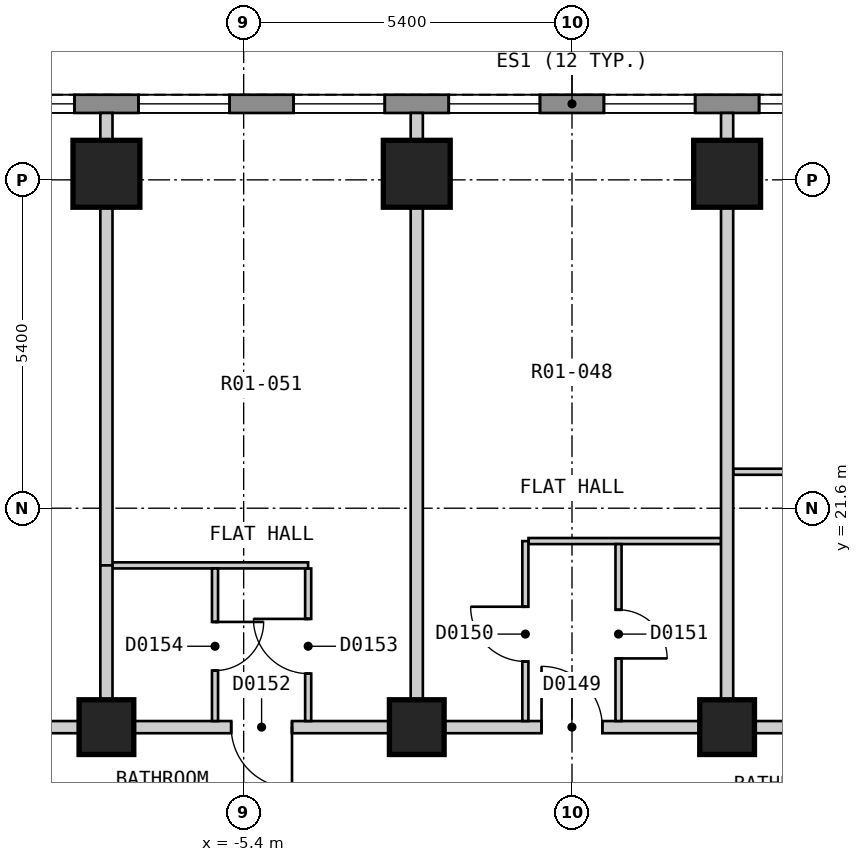
"""IFC4 building model, lengths in metres.
Left out: names, types, materials, properties, quantities, classifications, styles, units other than length and angle.
Written with IfcOpenShell. Run it as: python <this file> out.ifc"""

import sys

from ifc_helpers import new_model, si_unit, direction, frame, frame_2d, origin, origin_2d, place, context, subcontext, project, spatial, polyline, rectangle, outline, extrude, element, fill, save


model = new_model("IFC4")
c1 = context("Model", 3, precision=1e-05, world=origin(), true_north=direction((0.0, 1.0)))
c2 = subcontext(c1, "Body", "Model", "MODEL_VIEW")
j1 = project(units=[si_unit("LENGTHUNIT", "METRE"), si_unit("PLANEANGLEUNIT", "RADIAN")], contexts=[c1])
p1 = place(None, origin())
s1 = spatial("IfcSite", under=j1, at=p1, CompositionType="ELEMENT")
p2 = place(p1, origin())
s2 = spatial("IfcBuilding", under=s1, at=p2, CompositionType="ELEMENT")
p3 = place(p2, frame((0.0, 0.0, 29.4)))
s3 = spatial("IfcBuildingStorey", under=s2, at=p3, CompositionType="ELEMENT", Elevation=29.4)
for number, where, z_axis, x_axis in (
    (1, (2.551, 27.1, 0.0), (0.0, 0.0, 1.0), (-1.0, 0.0, 0.0)),
    (2, (-2.553, 27.1, 0.0), (0.0, 0.0, 1.0), (-1.0, 0.0, 0.0)),
    (3, (-7.657, 27.1, 0.0), (0.0, 0.0, 1.0), (-1.0, 0.0, 0.0)),
):
    element("IfcColumn", number, at=place(p3, frame(where, z_axis=z_axis, x_axis=x_axis)), inside=s3, PredefinedType="COLUMN", context=c2, shape_type="SweptSolid", body=[
        extrude(rectangle(XDim=1.1, YDim=1.1, at=origin_2d()), origin(), (0.0, 0.0, 1.0), 3.0),
    ])
for number, where, z_axis, x_axis in (
    (4, (2.551, 18.0, 0.0), (0.0, 0.0, 1.0), (-1.0, 0.0, 0.0)),
    (5, (-2.553, 18.0, 0.0), (0.0, 0.0, 1.0), (-1.0, 0.0, 0.0)),
    (6, (-7.657, 18.0, 0.0), (0.0, 0.0, 1.0), (-1.0, 0.0, 0.0)),
):
    element("IfcColumn", number, at=place(p3, frame(where, z_axis=z_axis, x_axis=x_axis)), inside=s3, PredefinedType="COLUMN", context=c2, shape_type="SweptSolid", body=[
        extrude(rectangle(XDim=0.9, YDim=0.9, at=origin_2d()), origin(), (0.0, 0.0, 1.0), 3.0),
    ])
p4 = place(p3, frame((13.51, 28.25, 0.0), z_axis=(0.0, 0.0, 1.0), x_axis=(-1.0, 0.0, 0.0)))
e7 = element("IfcWall", 7, at=p4, inside=s3, PredefinedType="SOLIDWALL", context=c2, shape_type="SweptSolid", body=[
    extrude(outline(polyline([(0.0, -0.15), (27.02, -0.15), (26.94, 0.15), (0.08, 0.15), (0.0, -0.15)])), origin(), (0.0, 0.0, 1.0), 2.7),
])
p5 = place(p4, frame((1.277, 0.0, 0.15)))
e8 = element("IfcOpeningElement", 8, at=p5, cuts=e7, PredefinedType="OPENING", context=c2, shape_type="SweptSolid", body=[
    extrude(rectangle(XDim=1.5, YDim=2.1, at=frame_2d((0.75, 1.05))), frame((0.0, 0.16, 0.0), z_axis=(0.0, -1.0, 0.0), x_axis=(1.0, 0.0, 0.0)), (0.0, 0.0, 1.0), 0.32),
])
p6 = place(p4, frame((3.829, 0.0, 0.15)))
e9 = element("IfcOpeningElement", 9, at=p6, cuts=e7, PredefinedType="OPENING", context=c2, shape_type="SweptSolid", body=[
    extrude(rectangle(XDim=1.5, YDim=2.1, at=frame_2d((0.75, 1.05))), frame((0.0, 0.16, 0.0), z_axis=(0.0, -1.0, 0.0), x_axis=(1.0, 0.0, 0.0)), (0.0, 0.0, 1.0), 0.32),
])
p7 = place(p4, frame((6.381, 0.0, 0.15)))
e10 = element("IfcOpeningElement", 10, at=p7, cuts=e7, PredefinedType="OPENING", context=c2, shape_type="SweptSolid", body=[
    extrude(rectangle(XDim=1.5, YDim=2.1, at=frame_2d((0.75, 1.05))), frame((0.0, 0.16, 0.0), z_axis=(0.0, -1.0, 0.0), x_axis=(1.0, 0.0, 0.0)), (0.0, 0.0, 1.0), 0.32),
])
p8 = place(p4, frame((8.933, 0.0, 0.15)))
e11 = element("IfcOpeningElement", 11, at=p8, cuts=e7, PredefinedType="OPENING", context=c2, shape_type="SweptSolid", body=[
    extrude(rectangle(XDim=1.5, YDim=2.1, at=frame_2d((0.75, 1.05))), frame((0.0, 0.16, 0.0), z_axis=(0.0, -1.0, 0.0), x_axis=(1.0, 0.0, 0.0)), (0.0, 0.0, 1.0), 0.32),
])
p9 = place(p4, frame((11.485, 0.0, 0.15)))
e12 = element("IfcOpeningElement", 12, at=p9, cuts=e7, PredefinedType="OPENING", context=c2, shape_type="SweptSolid", body=[
    extrude(rectangle(XDim=1.5, YDim=2.1, at=frame_2d((0.75, 1.05))), frame((0.0, 0.16, 0.0), z_axis=(0.0, -1.0, 0.0), x_axis=(1.0, 0.0, 0.0)), (0.0, 0.0, 1.0), 0.32),
])
p10 = place(p4, frame((14.037, 0.0, 0.15)))
e13 = element("IfcOpeningElement", 13, at=p10, cuts=e7, PredefinedType="OPENING", context=c2, shape_type="SweptSolid", body=[
    extrude(rectangle(XDim=1.5, YDim=2.1, at=frame_2d((0.75, 1.05))), frame((0.0, 0.16, 0.0), z_axis=(0.0, -1.0, 0.0), x_axis=(1.0, 0.0, 0.0)), (0.0, 0.0, 1.0), 0.32),
])
p11 = place(p4, frame((16.589, 0.0, 0.15)))
e14 = element("IfcOpeningElement", 14, at=p11, cuts=e7, PredefinedType="OPENING", context=c2, shape_type="SweptSolid", body=[
    extrude(rectangle(XDim=1.5, YDim=2.1, at=frame_2d((0.75, 1.05))), frame((0.0, 0.16, 0.0), z_axis=(0.0, -1.0, 0.0), x_axis=(1.0, 0.0, 0.0)), (0.0, 0.0, 1.0), 0.32),
])
p12 = place(p4, frame((19.141, 0.0, 0.15)))
e15 = element("IfcOpeningElement", 15, at=p12, cuts=e7, PredefinedType="OPENING", context=c2, shape_type="SweptSolid", body=[
    extrude(rectangle(XDim=1.5, YDim=2.1, at=frame_2d((0.75, 1.05))), frame((0.0, 0.16, 0.0), z_axis=(0.0, -1.0, 0.0), x_axis=(1.0, 0.0, 0.0)), (0.0, 0.0, 1.0), 0.32),
])
p13 = place(p4, frame((21.693, 0.0, 0.15)))
e16 = element("IfcOpeningElement", 16, at=p13, cuts=e7, PredefinedType="OPENING", context=c2, shape_type="SweptSolid", body=[
    extrude(rectangle(XDim=1.5, YDim=2.1, at=frame_2d((0.75, 1.05))), frame((0.0, 0.16, 0.0), z_axis=(0.0, -1.0, 0.0), x_axis=(1.0, 0.0, 0.0)), (0.0, 0.0, 1.0), 0.32),
])
p14 = place(p4, frame((24.245, 0.0, 0.15)))
e17 = element("IfcOpeningElement", 17, at=p14, cuts=e7, PredefinedType="OPENING", context=c2, shape_type="SweptSolid", body=[
    extrude(rectangle(XDim=1.5, YDim=2.1, at=frame_2d((0.75, 1.05))), frame((0.0, 0.16, 0.0), z_axis=(0.0, -1.0, 0.0), x_axis=(1.0, 0.0, 0.0)), (0.0, 0.0, 1.0), 0.32),
])
p15 = place(p3, frame((-10.276, 18.0, 0.0), z_axis=(0.0, 0.0, 1.0), x_axis=(1.0, 0.0, 0.0)))
e18 = element("IfcWall", 18, at=p15, inside=s3, PredefinedType="PARTITIONING", context=c2, shape_type="SweptSolid", body=[
    extrude(rectangle(XDim=20.61, YDim=0.2, at=frame_2d((10.305, 0.0))), origin(), (0.0, 0.0, 1.0), 2.7),
])
p16 = place(p15, frame((14.879, 0.0, 0.0)))
e19 = element("IfcOpeningElement", 19, at=p16, cuts=e18, PredefinedType="OPENING", context=c2, shape_type="SweptSolid", body=[
    extrude(rectangle(XDim=1.0, YDim=2.1, at=frame_2d((0.5, 1.05))), frame((0.0, 0.11, 0.0), z_axis=(0.0, -1.0, 0.0), x_axis=(1.0, 0.0, 0.0)), (0.0, 0.0, 1.0), 0.22),
])
p17 = place(p15, frame((9.775, 0.0, 0.0)))
e20 = element("IfcOpeningElement", 20, at=p17, cuts=e18, PredefinedType="OPENING", context=c2, shape_type="SweptSolid", body=[
    extrude(rectangle(XDim=1.0, YDim=2.1, at=frame_2d((0.5, 1.05))), frame((0.0, 0.11, 0.0), z_axis=(0.0, -1.0, 0.0), x_axis=(1.0, 0.0, 0.0)), (0.0, 0.0, 1.0), 0.22),
])
p18 = place(p15, frame((4.671, 0.0, 0.0)))
e21 = element("IfcOpeningElement", 21, at=p18, cuts=e18, PredefinedType="OPENING", context=c2, shape_type="SweptSolid", body=[
    extrude(rectangle(XDim=1.0, YDim=2.1, at=frame_2d((0.5, 1.05))), frame((0.0, 0.11, 0.0), z_axis=(0.0, -1.0, 0.0), x_axis=(1.0, 0.0, 0.0)), (0.0, 0.0, 1.0), 0.22),
])
p19 = place(p15, frame((0.837, 0.0, 0.0)))
e22 = element("IfcOpeningElement", 22, at=p19, cuts=e18, PredefinedType="OPENING", context=c2, shape_type="SweptSolid", body=[
    extrude(rectangle(XDim=0.8, YDim=2.1, at=frame_2d((0.4, 1.05))), frame((0.0, 0.11, 0.0), z_axis=(0.0, -1.0, 0.0), x_axis=(1.0, 0.0, 0.0)), (0.0, 0.0, 1.0), 0.22),
])
p20 = place(p3, frame((-4.339, 20.609, 0.0), z_axis=(0.0, 0.0, 1.0), x_axis=(0.0, -1.0, 0.0)))
e23 = element("IfcWall", 23, at=p20, inside=s3, PredefinedType="PARTITIONING", context=c2, shape_type="SweptSolid", body=[
    extrude(rectangle(XDim=2.509, YDim=0.1, at=frame_2d((1.254, 0.0))), origin(), (0.0, 0.0, 1.0), 2.7),
])
p21 = place(p20, frame((0.829, 0.0, 0.0)))
e24 = element("IfcOpeningElement", 24, at=p21, cuts=e23, PredefinedType="OPENING", context=c2, shape_type="SweptSolid", body=[
    extrude(rectangle(XDim=0.9, YDim=2.1, at=frame_2d((0.45, 1.05))), frame((0.0, 0.06, 0.0), z_axis=(0.0, -1.0, 0.0), x_axis=(1.0, 0.0, 0.0)), (0.0, 0.0, 1.0), 0.12),
])
p22 = place(p3, frame((-7.557, 20.66, 0.0), z_axis=(0.0, 0.0, 1.0), x_axis=(1.0, 0.0, 0.0)))
e25 = element("IfcWall", 25, at=p22, inside=s3, PredefinedType="PARTITIONING", context=c2, shape_type="SweptSolid", body=[
    extrude(rectangle(XDim=3.217, YDim=0.1, at=frame_2d((1.608, 0.0))), origin(), (0.0, 0.0, 1.0), 2.7),
])
p23 = place(p3, frame((-0.716, 21.06, 0.0), z_axis=(0.0, 0.0, 1.0), x_axis=(1.0, 0.0, 0.0)))
e26 = element("IfcWall", 26, at=p23, inside=s3, PredefinedType="PARTITIONING", context=c2, shape_type="SweptSolid", body=[
    extrude(rectangle(XDim=3.167, YDim=0.1, at=frame_2d((1.583, 0.0))), origin(), (0.0, 0.0, 1.0), 2.7),
])
p24 = place(p3, frame((2.651, 22.2, 0.0), z_axis=(0.0, 0.0, 1.0), x_axis=(1.0, 0.0, 0.0)))
e27 = element("IfcWall", 27, at=p24, inside=s3, PredefinedType="PARTITIONING", context=c2, shape_type="SweptSolid", body=[
    extrude(rectangle(XDim=10.109, YDim=0.1, at=frame_2d((5.055, 0.0))), origin(), (0.0, 0.0, 1.0), 2.7),
])
p25 = place(p24, frame((2.002, 0.0, 0.0)))
e28 = element("IfcOpeningElement", 28, at=p25, cuts=e27, PredefinedType="OPENING", context=c2, shape_type="SweptSolid", body=[
    extrude(rectangle(XDim=0.9, YDim=2.1, at=frame_2d((0.45, 1.05))), frame((0.0, 0.06, 0.0), z_axis=(0.0, -1.0, 0.0), x_axis=(1.0, 0.0, 0.0)), (0.0, 0.0, 1.0), 0.12),
])
p26 = place(p24, frame((7.185, 0.0, 0.0)))
e29 = element("IfcOpeningElement", 29, at=p26, cuts=e27, PredefinedType="OPENING", context=c2, shape_type="SweptSolid", body=[
    extrude(rectangle(XDim=0.8, YDim=2.1, at=frame_2d((0.4, 1.05))), frame((0.0, 0.06, 0.0), z_axis=(0.0, -1.0, 0.0), x_axis=(1.0, 0.0, 0.0)), (0.0, 0.0, 1.0), 0.12),
])
p27 = place(p3, frame((0.765, 18.1, 0.0), z_axis=(0.0, 0.0, 1.0), x_axis=(0.0, 1.0, 0.0)))
e30 = element("IfcWall", 30, at=p27, inside=s3, PredefinedType="PARTITIONING", context=c2, shape_type="SweptSolid", body=[
    extrude(rectangle(XDim=2.91, YDim=0.1, at=frame_2d((1.455, 0.0))), origin(), (0.0, 0.0, 1.0), 2.7),
])
p28 = place(p27, frame((1.03, 0.0, 0.0)))
e31 = element("IfcOpeningElement", 31, at=p28, cuts=e30, PredefinedType="OPENING", context=c2, shape_type="SweptSolid", body=[
    extrude(rectangle(XDim=0.8, YDim=2.1, at=frame_2d((0.4, 1.05))), frame((0.0, 0.06, 0.0), z_axis=(0.0, -1.0, 0.0), x_axis=(1.0, 0.0, 0.0)), (0.0, 0.0, 1.0), 0.12),
])
p29 = place(p3, frame((-5.871, 18.1, 0.0), z_axis=(0.0, 0.0, 1.0), x_axis=(0.0, 1.0, 0.0)))
e32 = element("IfcWall", 32, at=p29, inside=s3, PredefinedType="PARTITIONING", context=c2, shape_type="SweptSolid", body=[
    extrude(rectangle(XDim=2.51, YDim=0.1, at=frame_2d((1.255, 0.0))), origin(), (0.0, 0.0, 1.0), 2.7),
])
p30 = place(p29, frame((0.83, 0.0, 0.0)))
e33 = element("IfcOpeningElement", 33, at=p30, cuts=e32, PredefinedType="OPENING", context=c2, shape_type="SweptSolid", body=[
    extrude(rectangle(XDim=0.8, YDim=2.1, at=frame_2d((0.4, 1.05))), frame((0.0, 0.06, 0.0), z_axis=(0.0, -1.0, 0.0), x_axis=(1.0, 0.0, 0.0)), (0.0, 0.0, 1.0), 0.12),
])
p31 = place(p3, frame((-0.767, 18.1, 0.0), z_axis=(0.0, 0.0, 1.0), x_axis=(0.0, 1.0, 0.0)))
e34 = element("IfcWall", 34, at=p31, inside=s3, PredefinedType="PARTITIONING", context=c2, shape_type="SweptSolid", body=[
    extrude(rectangle(XDim=2.959, YDim=0.1, at=frame_2d((1.479, 0.0))), origin(), (0.0, 0.0, 1.0), 2.7),
])
p32 = place(p31, frame((0.98, 0.0, 0.0)))
e35 = element("IfcOpeningElement", 35, at=p32, cuts=e34, PredefinedType="OPENING", context=c2, shape_type="SweptSolid", body=[
    extrude(rectangle(XDim=0.9, YDim=2.1, at=frame_2d((0.45, 1.05))), frame((0.0, 0.06, 0.0), z_axis=(0.0, -1.0, 0.0), x_axis=(1.0, 0.0, 0.0)), (0.0, 0.0, 1.0), 0.12),
])
p33 = place(p3, frame((-7.657, 28.1, 0.0), z_axis=(0.0, 0.0, 1.0), x_axis=(0.0, -1.0, 0.0)))
e36 = element("IfcWall", 36, at=p33, inside=s3, PredefinedType="PARTITIONING", context=c2, shape_type="SweptSolid", body=[
    extrude(rectangle(XDim=7.44, YDim=0.2, at=frame_2d((3.72, 0.0))), origin(), (0.0, 0.0, 1.0), 2.7),
])
for number, where, z_axis, x_axis in (
    (37, (-2.553, 28.1, 0.0), (0.0, 0.0, 1.0), (0.0, -1.0, 0.0)),
    (38, (2.551, 18.1, 0.0), (0.0, 0.0, 1.0), (0.0, 1.0, 0.0)),
):
    element("IfcWall", number, at=place(p3, frame(where, z_axis=z_axis, x_axis=x_axis)), inside=s3, PredefinedType="PARTITIONING", context=c2, shape_type="SweptSolid", body=[
        extrude(rectangle(XDim=10.0, YDim=0.2, at=frame_2d((5.0, 0.0))), origin(), (0.0, 0.0, 1.0), 2.7),
    ])
p34 = place(p3, frame((-7.657, 18.1, 0.0), z_axis=(0.0, 0.0, 1.0), x_axis=(0.0, 1.0, 0.0)))
e39 = element("IfcWall", 39, at=p34, inside=s3, PredefinedType="PARTITIONING", context=c2, shape_type="SweptSolid", body=[
    extrude(rectangle(XDim=2.56, YDim=0.2, at=frame_2d((1.28, 0.0))), origin(), (0.0, 0.0, 1.0), 2.7),
])
p35 = place(p8, origin())
e40 = element("IfcWindow", 40, at=p35, inside=s3, PartitioningType="SINGLE_PANEL", PredefinedType="WINDOW", context=c2, shape_type="SweptSolid", body=[
    extrude(rectangle(XDim=1.5, YDim=2.1, at=frame_2d((0.75, 1.05))), frame((0.0, 0.03, 0.0), z_axis=(0.0, -1.0, 0.0), x_axis=(1.0, 0.0, 0.0)), (0.0, 0.0, 1.0), 0.06),
])
fill(e11, e40)
p36 = place(p9, origin())
e41 = element("IfcWindow", 41, at=p36, inside=s3, PartitioningType="SINGLE_PANEL", PredefinedType="WINDOW", context=c2, shape_type="SweptSolid", body=[
    extrude(rectangle(XDim=1.5, YDim=2.1, at=frame_2d((0.75, 1.05))), frame((0.0, 0.03, 0.0), z_axis=(0.0, -1.0, 0.0), x_axis=(1.0, 0.0, 0.0)), (0.0, 0.0, 1.0), 0.06),
])
fill(e12, e41)
p37 = place(p10, origin())
e42 = element("IfcWindow", 42, at=p37, inside=s3, PartitioningType="SINGLE_PANEL", PredefinedType="WINDOW", context=c2, shape_type="SweptSolid", body=[
    extrude(rectangle(XDim=1.5, YDim=2.1, at=frame_2d((0.75, 1.05))), frame((0.0, 0.03, 0.0), z_axis=(0.0, -1.0, 0.0), x_axis=(1.0, 0.0, 0.0)), (0.0, 0.0, 1.0), 0.06),
])
fill(e13, e42)
p38 = place(p11, origin())
e43 = element("IfcWindow", 43, at=p38, inside=s3, PartitioningType="SINGLE_PANEL", PredefinedType="WINDOW", context=c2, shape_type="SweptSolid", body=[
    extrude(rectangle(XDim=1.5, YDim=2.1, at=frame_2d((0.75, 1.05))), frame((0.0, 0.03, 0.0), z_axis=(0.0, -1.0, 0.0), x_axis=(1.0, 0.0, 0.0)), (0.0, 0.0, 1.0), 0.06),
])
fill(e14, e43)
p39 = place(p12, origin())
e44 = element("IfcWindow", 44, at=p39, inside=s3, PartitioningType="SINGLE_PANEL", PredefinedType="WINDOW", context=c2, shape_type="SweptSolid", body=[
    extrude(rectangle(XDim=1.5, YDim=2.1, at=frame_2d((0.75, 1.05))), frame((0.0, 0.03, 0.0), z_axis=(0.0, -1.0, 0.0), x_axis=(1.0, 0.0, 0.0)), (0.0, 0.0, 1.0), 0.06),
])
fill(e15, e44)
p40 = place(p13, origin())
e45 = element("IfcWindow", 45, at=p40, inside=s3, PartitioningType="SINGLE_PANEL", PredefinedType="WINDOW", context=c2, shape_type="SweptSolid", body=[
    extrude(rectangle(XDim=1.5, YDim=2.1, at=frame_2d((0.75, 1.05))), frame((0.0, 0.03, 0.0), z_axis=(0.0, -1.0, 0.0), x_axis=(1.0, 0.0, 0.0)), (0.0, 0.0, 1.0), 0.06),
])
fill(e16, e45)
p41 = place(p17, origin())
e46 = element("IfcDoor", 46, at=p41, inside=s3, OperationType="SINGLE_SWING_LEFT", PredefinedType="DOOR", context=c2, shape_type="SweptSolid", body=[
    extrude(rectangle(XDim=1.0, YDim=2.1, at=frame_2d((0.5, 1.05))), frame((0.0, 0.025, 0.0), z_axis=(0.0, -1.0, 0.0), x_axis=(1.0, 0.0, 0.0)), (0.0, 0.0, 1.0), 0.05),
])
fill(e20, e46)
p42 = place(p32, origin())
e47 = element("IfcDoor", 47, at=p42, inside=s3, OperationType="SINGLE_SWING_RIGHT", PredefinedType="DOOR", context=c2, shape_type="SweptSolid", body=[
    extrude(rectangle(XDim=0.9, YDim=2.1, at=frame_2d((0.45, 1.05))), frame((0.0, 0.025, 0.0), z_axis=(0.0, -1.0, 0.0), x_axis=(1.0, 0.0, 0.0)), (0.0, 0.0, 1.0), 0.05),
])
fill(e35, e47)
p43 = place(p28, origin())
e48 = element("IfcDoor", 48, at=p43, inside=s3, OperationType="SINGLE_SWING_LEFT", PredefinedType="DOOR", context=c2, shape_type="SweptSolid", body=[
    extrude(rectangle(XDim=0.8, YDim=2.1, at=frame_2d((0.4, 1.05))), frame((0.0, 0.025, 0.0), z_axis=(0.0, -1.0, 0.0), x_axis=(1.0, 0.0, 0.0)), (0.0, 0.0, 1.0), 0.05),
])
fill(e31, e48)
p44 = place(p18, origin())
e49 = element("IfcDoor", 49, at=p44, inside=s3, OperationType="SINGLE_SWING_RIGHT", PredefinedType="DOOR", context=c2, shape_type="SweptSolid", body=[
    extrude(rectangle(XDim=1.0, YDim=2.1, at=frame_2d((0.5, 1.05))), frame((0.0, 0.025, 0.0), z_axis=(0.0, -1.0, 0.0), x_axis=(1.0, 0.0, 0.0)), (0.0, 0.0, 1.0), 0.05),
])
fill(e21, e49)
p45 = place(p21, origin())
e50 = element("IfcDoor", 50, at=p45, inside=s3, OperationType="SINGLE_SWING_LEFT", PredefinedType="DOOR", context=c2, shape_type="SweptSolid", body=[
    extrude(rectangle(XDim=0.9, YDim=2.1, at=frame_2d((0.45, 1.05))), frame((0.0, 0.025, 0.0), z_axis=(0.0, -1.0, 0.0), x_axis=(1.0, 0.0, 0.0)), (0.0, 0.0, 1.0), 0.05),
])
fill(e24, e50)
p46 = place(p30, origin())
e51 = element("IfcDoor", 51, at=p46, inside=s3, OperationType="SINGLE_SWING_RIGHT", PredefinedType="DOOR", context=c2, shape_type="SweptSolid", body=[
    extrude(rectangle(XDim=0.8, YDim=2.1, at=frame_2d((0.4, 1.05))), frame((0.0, 0.025, 0.0), z_axis=(0.0, -1.0, 0.0), x_axis=(1.0, 0.0, 0.0)), (0.0, 0.0, 1.0), 0.05),
])
fill(e33, e51)
save(model, sys.argv[1])
